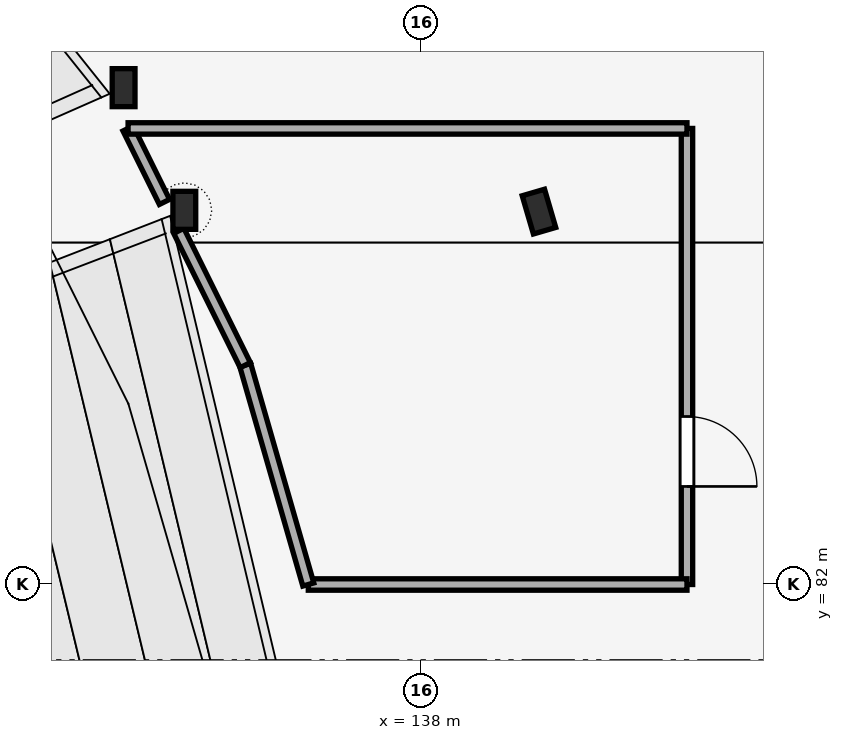
"""IFC4 building model, lengths in metres.
Left out: names, types, materials, properties, quantities, classifications, styles, units other than length and angle.
Written with IfcOpenShell. Run it as: python <this file> out.ifc"""

import sys

from ifc_helpers import new_model, si_unit, direction, frame, frame_2d, origin, origin_2d, place, context, subcontext, project, spatial, rectangle, i_section, extrude, element, fill, save


model = new_model("IFC4")
c1 = context("Model", 3, precision=1e-05, world=origin(), true_north=direction((0.0, 1.0)))
c2 = subcontext(c1, "Body", "Model", "MODEL_VIEW")
j1 = project(units=[si_unit("LENGTHUNIT", "METRE"), si_unit("PLANEANGLEUNIT", "RADIAN")], contexts=[c1])
p1 = place(None, origin())
s1 = spatial("IfcSite", under=j1, at=p1, CompositionType="ELEMENT")
p2 = place(p1, origin())
s2 = spatial("IfcBuilding", under=s1, at=p2, CompositionType="ELEMENT")
p3 = place(p2, frame((0.0, 0.0, 15.0)))
s3 = spatial("IfcBuildingStorey", under=s2, at=p3, CompositionType="ELEMENT", Elevation=15.0)
p4 = place(p3, frame((139.553, 86.906, 0.0), z_axis=(0.0, 0.0, 1.0), x_axis=(0.959805291975, 0.280666708921, 0.0)))
e1 = element("IfcColumn", 1, at=p4, inside=s3, PredefinedType="COLUMN", context=c2, shape_type="SweptSolid", body=[
    extrude(i_section(OverallWidth=0.306, OverallDepth=0.524, WebThickness=0.021, FlangeThickness=0.04, FilletRadius=0.027, at=origin_2d()), origin(), (0.0, 0.0, 1.0), 4.5),
])
for number, where, z_axis, x_axis in (
    (2, (134.887, 86.923, 0.0), (0.0, 0.0, 1.0), (1.0, 0.0, 0.0)),
    (3, (134.088, 88.537, 0.0), (0.0, 0.0, 1.0), (1.0, 0.0, 0.0)),
):
    element("IfcColumn", number, at=place(p3, frame(where, z_axis=z_axis, x_axis=x_axis)), inside=s3, PredefinedType="COLUMN", context=c2, shape_type="SweptSolid", body=[
        extrude(i_section(OverallWidth=0.3, OverallDepth=0.5, WebThickness=0.014, FlangeThickness=0.028, FilletRadius=0.027, at=origin_2d()), origin(), (0.0, 0.0, 1.0), 4.5),
    ])
p5 = place(p3, frame((142.5, 92.835, 0.0), z_axis=(0.0, 0.0, 1.0), x_axis=(0.68612091604, -0.727487517812, 0.0)))
e4 = element("IfcWall", 4, at=p5, inside=s3, PredefinedType="STANDARD", context=c2, shape_type="SweptSolid", body=[
    extrude(rectangle(XDim=5.707, YDim=0.32, at=frame_2d((2.854, 0.0))), origin(), (0.0, 0.0, 1.0), 4.25),
])
p6 = place(p5, frame((1.654, 0.0, 1.15)))
e5 = element("IfcOpeningElement", 5, at=p6, cuts=e4, PredefinedType="OPENING", context=c2, shape_type="SweptSolid", body=[
    extrude(rectangle(XDim=2.4, YDim=1.4, at=frame_2d((1.2, 0.7))), frame((0.0, 0.17, 0.0), z_axis=(0.0, -1.0, 0.0), x_axis=(1.0, 0.0, 0.0)), (0.0, 0.0, 1.0), 0.34),
])
p7 = place(p3, frame((141.5, 88.0, 0.0), z_axis=(0.0, 0.0, 1.0), x_axis=(0.0, -1.0, 0.0)))
e6 = element("IfcWall", 6, at=p7, inside=s3, PredefinedType="PARTITIONING", context=c2, shape_type="SweptSolid", body=[
    extrude(rectangle(XDim=6.0, YDim=0.15, at=frame_2d((3.0, 0.0))), origin(), (0.0, 0.0, 1.0), 4.25),
])
p8 = place(p7, frame((3.79, 0.0, 0.0)))
e7 = element("IfcOpeningElement", 7, at=p8, cuts=e6, PredefinedType="OPENING", context=c2, shape_type="SweptSolid", body=[
    extrude(rectangle(XDim=0.92, YDim=2.15, at=frame_2d((0.46, 1.075))), frame((0.0, 0.085, 0.0), z_axis=(0.0, -1.0, 0.0), x_axis=(1.0, 0.0, 0.0)), (0.0, 0.0, 1.0), 0.17),
])
p9 = place(p3, frame((141.5, 82.0, 0.0), z_axis=(0.0, 0.0, 1.0), x_axis=(-1.0, 0.0, 0.0)))
e8 = element("IfcWall", 8, at=p9, inside=s3, PredefinedType="PARTITIONING", context=c2, shape_type="SweptSolid", body=[
    extrude(rectangle(XDim=4.982, YDim=0.15, at=frame_2d((2.491, 0.0))), origin(), (0.0, 0.0, 1.0), 4.25),
])
p10 = place(p3, frame((136.518, 82.0, 0.0), z_axis=(0.0, 0.0, 1.0), x_axis=(-0.276116855518, 0.961124072167, 0.0)))
e9 = element("IfcWall", 9, at=p10, inside=s3, PredefinedType="PARTITIONING", context=c2, shape_type="SweptSolid", body=[
    extrude(rectangle(XDim=3.003, YDim=0.15, at=frame_2d((1.501, 0.0))), origin(), (0.0, 0.0, 1.0), 4.25),
])
p11 = place(p3, frame((135.689, 84.886, 0.0), z_axis=(0.0, 0.0, 1.0), x_axis=(-0.443693284065, 0.896178704096, 0.0)))
e10 = element("IfcWall", 10, at=p11, inside=s3, PredefinedType="PARTITIONING", context=c2, shape_type="SweptSolid", body=[
    extrude(rectangle(XDim=1.971, YDim=0.15, at=frame_2d((0.986, 0.0))), origin(), (0.0, 0.0, 1.0), 4.25),
])
p12 = place(p3, frame((134.626, 87.033, 0.0), z_axis=(0.0, 0.0, 1.0), x_axis=(-0.443588797361, 0.896230427321, 0.0)))
e11 = element("IfcWall", 11, at=p12, inside=s3, PredefinedType="PARTITIONING", context=c2, shape_type="SweptSolid", body=[
    extrude(rectangle(XDim=1.079, YDim=0.15, at=frame_2d((0.54, 0.0))), origin(), (0.0, 0.0, 1.0), 4.25),
])
p13 = place(p3, frame((134.147, 88.0, 0.0), z_axis=(0.0, 0.0, 1.0), x_axis=(1.0, 0.0, 0.0)))
e12 = element("IfcWall", 12, at=p13, inside=s3, PredefinedType="PARTITIONING", context=c2, shape_type="SweptSolid", body=[
    extrude(rectangle(XDim=7.353, YDim=0.15, at=frame_2d((3.676, 0.0))), origin(), (0.0, 0.0, 1.0), 4.25),
])
p14 = place(p8, origin())
e13 = element("IfcDoor", 13, at=p14, inside=s3, OperationType="SINGLE_SWING_RIGHT", PredefinedType="DOOR", context=c2, shape_type="SweptSolid", body=[
    extrude(rectangle(XDim=0.92, YDim=2.15, at=frame_2d((0.46, 1.075))), frame((0.0, 0.025, 0.0), z_axis=(0.0, -1.0, 0.0), x_axis=(1.0, 0.0, 0.0)), (0.0, 0.0, 1.0), 0.05),
])
fill(e7, e13)
save(model, sys.argv[1])
